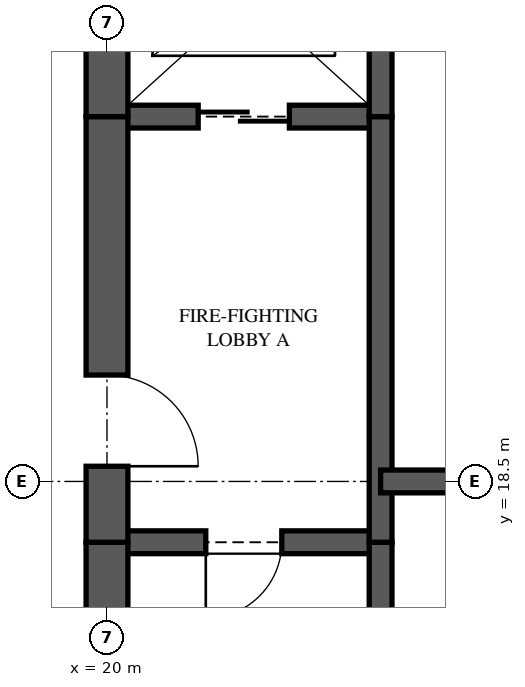
"""IFC4 building model, lengths in metres.
Left out: names, types, materials, properties, quantities, classifications, styles, units other than length and angle.
Written with IfcOpenShell. Run it as: python <this file> out.ifc"""

import sys

from ifc_helpers import new_model, si_unit, direction, frame, frame_2d, origin, place, context, subcontext, project, spatial, rectangle, extrude, element, fill, save


model = new_model("IFC4")
c1 = context("Model", 3, precision=1e-05, world=origin(), true_north=direction((0.0, 1.0)))
c2 = subcontext(c1, "Body", "Model", "MODEL_VIEW")
j1 = project(units=[si_unit("LENGTHUNIT", "METRE"), si_unit("PLANEANGLEUNIT", "RADIAN")], contexts=[c1])
p1 = place(None, origin())
s1 = spatial("IfcSite", under=j1, at=p1, CompositionType="ELEMENT")
p2 = place(p1, origin())
s2 = spatial("IfcBuilding", under=s1, at=p2, CompositionType="ELEMENT")
p3 = place(p2, frame((0.0, 0.0, 252.95)))
s3 = spatial("IfcBuildingStorey", under=s2, at=p3, CompositionType="ELEMENT", Elevation=252.95)
p4 = place(p3, frame((20.0, 26.325, 0.0), z_axis=(0.0, 0.0, 1.0), x_axis=(0.0, -1.0, 0.0)))
e1 = element("IfcWall", 1, at=p4, inside=s3, PredefinedType="SHEAR", context=c2, shape_type="SweptSolid", body=[
    extrude(rectangle(XDim=3.025, YDim=0.55, at=frame_2d((1.512, 0.0))), origin(), (0.0, 0.0, 1.0), 3.5),
])
p5 = place(p3, frame((20.0, 23.3, 0.0), z_axis=(0.0, 0.0, 1.0), x_axis=(0.0, -1.0, 0.0)))
e2 = element("IfcWall", 2, at=p5, inside=s3, PredefinedType="SHEAR", context=c2, shape_type="SweptSolid", body=[
    extrude(rectangle(XDim=5.6, YDim=0.55, at=frame_2d((2.8, 0.0))), origin(), (0.0, 0.0, 1.0), 3.5),
])
p6 = place(p5, frame((3.4, 0.0, 0.0)))
e3 = element("IfcOpeningElement", 3, at=p6, cuts=e2, PredefinedType="OPENING", context=c2, shape_type="SweptSolid", body=[
    extrude(rectangle(XDim=1.2, YDim=2.2, at=frame_2d((0.6, 1.1))), frame((0.0, 0.285, 0.0), z_axis=(0.0, -1.0, 0.0), x_axis=(1.0, 0.0, 0.0)), (0.0, 0.0, 1.0), 0.57),
])
p7 = place(p3, frame((20.0, 17.7, 0.0), z_axis=(0.0, 0.0, 1.0), x_axis=(0.0, -1.0, 0.0)))
e4 = element("IfcWall", 4, at=p7, inside=s3, PredefinedType="SHEAR", context=c2, shape_type="SweptSolid", body=[
    extrude(rectangle(XDim=4.7, YDim=0.55, at=frame_2d((2.35, 0.0))), origin(), (0.0, 0.0, 1.0), 3.5),
])
p8 = place(p3, frame((23.6, 10.675, 0.0), z_axis=(0.0, 0.0, 1.0), x_axis=(0.0, 1.0, 0.0)))
e5 = element("IfcWall", 5, at=p8, inside=s3, PredefinedType="SHEAR", context=c2, shape_type="SweptSolid", body=[
    extrude(rectangle(XDim=7.025, YDim=0.3, at=frame_2d((3.512, 0.0))), origin(), (0.0, 0.0, 1.0), 3.5),
])
p9 = place(p3, frame((23.6, 17.7, 0.0), z_axis=(0.0, 0.0, 1.0), x_axis=(0.0, 1.0, 0.0)))
e6 = element("IfcWall", 6, at=p9, inside=s3, PredefinedType="SHEAR", context=c2, shape_type="SweptSolid", body=[
    extrude(rectangle(XDim=5.6, YDim=0.3, at=frame_2d((2.8, 0.0))), origin(), (0.0, 0.0, 1.0), 3.5),
])
p10 = place(p3, frame((23.6, 23.3, 0.0), z_axis=(0.0, 0.0, 1.0), x_axis=(0.0, 1.0, 0.0)))
e7 = element("IfcWall", 7, at=p10, inside=s3, PredefinedType="SHEAR", context=c2, shape_type="SweptSolid", body=[
    extrude(rectangle(XDim=3.025, YDim=0.3, at=frame_2d((1.512, 0.0))), origin(), (0.0, 0.0, 1.0), 3.5),
])
p11 = place(p3, frame((20.0, 17.7, 0.0), z_axis=(0.0, 0.0, 1.0), x_axis=(1.0, 0.0, 0.0)))
e8 = element("IfcWall", 8, at=p11, inside=s3, PredefinedType="SHEAR", context=c2, shape_type="SweptSolid", body=[
    extrude(rectangle(XDim=3.6, YDim=0.3, at=frame_2d((1.8, 0.0))), origin(), (0.0, 0.0, 1.0), 3.5),
])
p12 = place(p11, frame((1.3, 0.0, 0.0)))
e9 = element("IfcOpeningElement", 9, at=p12, cuts=e8, PredefinedType="OPENING", context=c2, shape_type="SweptSolid", body=[
    extrude(rectangle(XDim=1.0, YDim=2.1, at=frame_2d((0.5, 1.05))), frame((0.0, 0.16, 0.0), z_axis=(0.0, -1.0, 0.0), x_axis=(1.0, 0.0, 0.0)), (0.0, 0.0, 1.0), 0.32),
])
p13 = place(p3, frame((20.0, 23.3, 0.0), z_axis=(0.0, 0.0, 1.0), x_axis=(1.0, 0.0, 0.0)))
e10 = element("IfcWall", 10, at=p13, inside=s3, PredefinedType="SHEAR", context=c2, shape_type="SweptSolid", body=[
    extrude(rectangle(XDim=3.6, YDim=0.3, at=frame_2d((1.8, 0.0))), origin(), (0.0, 0.0, 1.0), 3.5),
])
p14 = place(p13, frame((1.2, 0.0, 0.0)))
e11 = element("IfcOpeningElement", 11, at=p14, cuts=e10, PredefinedType="OPENING", context=c2, shape_type="SweptSolid", body=[
    extrude(rectangle(XDim=1.2, YDim=2.1, at=frame_2d((0.6, 1.05))), frame((0.0, 0.16, 0.0), z_axis=(0.0, -1.0, 0.0), x_axis=(1.0, 0.0, 0.0)), (0.0, 0.0, 1.0), 0.32),
])
p15 = place(p3, frame((23.6, 18.5, 0.0), z_axis=(0.0, 0.0, 1.0), x_axis=(1.0, 0.0, 0.0)))
e12 = element("IfcWall", 12, at=p15, inside=s3, PredefinedType="SHEAR", context=c2, shape_type="SweptSolid", body=[
    extrude(rectangle(XDim=2.4, YDim=0.3, at=frame_2d((1.2, 0.0))), origin(), (0.0, 0.0, 1.0), 3.5),
])
p16 = place(p12, frame((1.0, 0.0, 0.0), z_axis=(0.0, 0.0, 1.0), x_axis=(-1.0, 0.0, 0.0)))
e13 = element("IfcDoor", 13, at=p16, inside=s3, OperationType="SINGLE_SWING_RIGHT", PredefinedType="DOOR", context=c2, shape_type="SweptSolid", body=[
    extrude(rectangle(XDim=1.0, YDim=2.1, at=frame_2d((0.5, 1.05))), frame((0.0, 0.025, 0.0), z_axis=(0.0, -1.0, 0.0), x_axis=(1.0, 0.0, 0.0)), (0.0, 0.0, 1.0), 0.05),
])
fill(e9, e13)
p17 = place(p6, origin())
e14 = element("IfcDoor", 14, at=p17, inside=s3, OperationType="SINGLE_SWING_RIGHT", PredefinedType="DOOR", context=c2, shape_type="SweptSolid", body=[
    extrude(rectangle(XDim=1.2, YDim=2.2, at=frame_2d((0.6, 1.1))), frame((0.0, 0.025, 0.0), z_axis=(0.0, -1.0, 0.0), x_axis=(1.0, 0.0, 0.0)), (0.0, 0.0, 1.0), 0.05),
])
fill(e3, e14)
p18 = place(p14, origin())
e15 = element("IfcDoor", 15, at=p18, inside=s3, OperationType="SLIDING_TO_LEFT", PredefinedType="DOOR", context=c2, shape_type="SweptSolid", body=[
    extrude(rectangle(XDim=1.2, YDim=2.1, at=frame_2d((0.6, 1.05))), frame((0.0, 0.025, 0.0), z_axis=(0.0, -1.0, 0.0), x_axis=(1.0, 0.0, 0.0)), (0.0, 0.0, 1.0), 0.05),
])
fill(e11, e15)
save(model, sys.argv[1])
